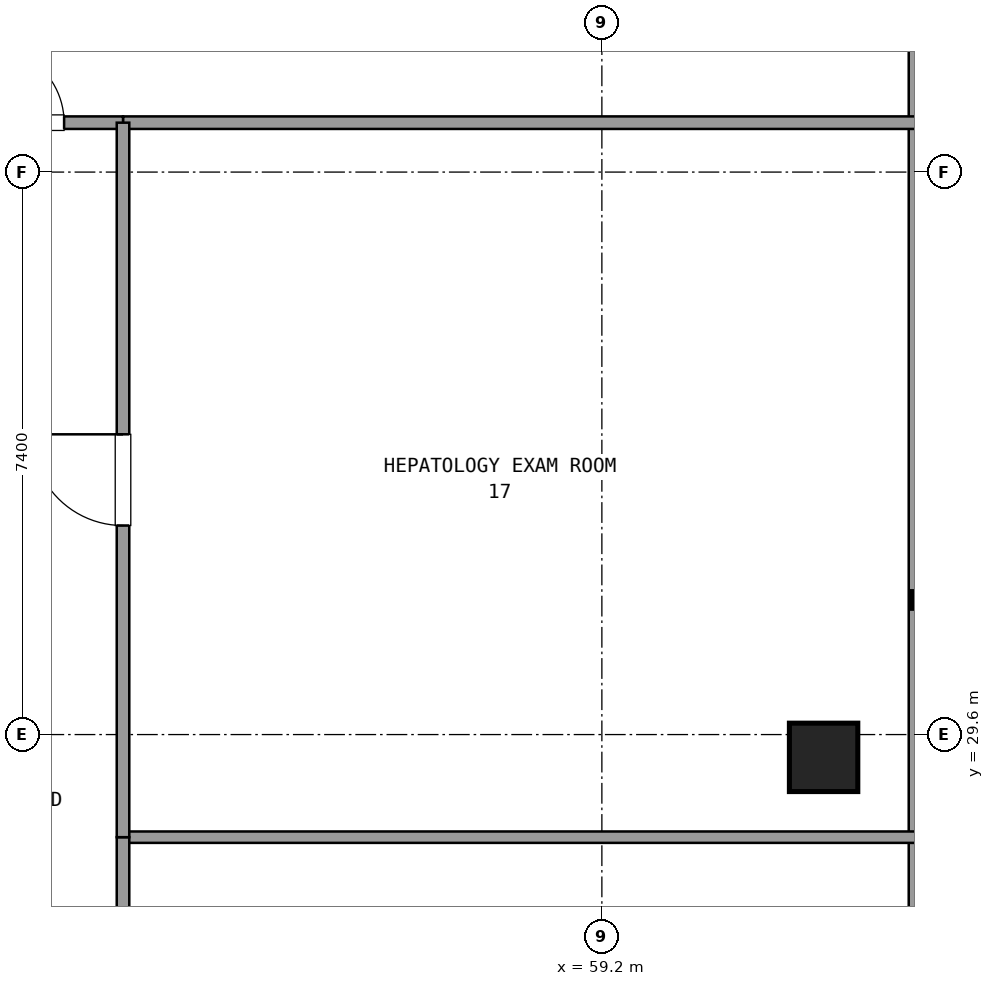
"""IFC4 building model, lengths in metres.
Left out: names, types, materials, properties, quantities, classifications, styles, units other than length and angle.
Written with IfcOpenShell. Run it as: python <this file> out.ifc"""

import sys

from ifc_helpers import new_model, si_unit, direction, frame, frame_2d, origin, origin_2d, place, context, subcontext, project, spatial, rectangle, extrude, element, fill, save


model = new_model("IFC4")
c1 = context("Model", 3, precision=1e-05, world=origin(), true_north=direction((0.0, 1.0)))
c2 = subcontext(c1, "Body", "Model", "MODEL_VIEW")
j1 = project(units=[si_unit("LENGTHUNIT", "METRE"), si_unit("PLANEANGLEUNIT", "RADIAN")], contexts=[c1])
p1 = place(None, origin())
s1 = spatial("IfcSite", under=j1, at=p1, CompositionType="ELEMENT")
p2 = place(p1, origin())
s2 = spatial("IfcBuilding", under=s1, at=p2, CompositionType="ELEMENT")
p3 = place(p2, frame((0.0, 0.0, 214.38)))
s3 = spatial("IfcBuildingStorey", under=s2, at=p3, CompositionType="ELEMENT", Elevation=214.38)
p4 = place(p3, frame((62.117, 29.3, 0.021), z_axis=(0.084573087246, 0.0, 0.99641727851), x_axis=(0.0, 1.0, 0.0)))
e1 = element("IfcColumn", 1, at=p4, inside=s3, PredefinedType="COLUMN", context=c2, shape_type="SweptSolid", body=[
    extrude(rectangle(XDim=0.9, YDim=0.9, at=origin_2d()), origin(), (0.0, 0.0, 1.0), 3.571),
])
p5 = place(p3, frame((63.357, 9.487, 0.0), z_axis=(0.0, 0.0, 1.0), x_axis=(0.0, 1.0, 0.0)))
e2 = element("IfcWall", 2, at=p5, inside=s3, PredefinedType="SOLIDWALL", context=c2, shape_type="SweptSolid", body=[
    extrude(rectangle(XDim=32.826, YDim=0.24, at=frame_2d((16.413, 0.0))), origin(), (0.0, 0.0, 1.0), 0.85),
])
p6 = place(p3, frame((52.9, 37.65, 0.0), z_axis=(0.0, 0.0, 1.0), x_axis=(1.0, 0.0, 0.0)))
e3 = element("IfcWall", 3, at=p6, inside=s3, PredefinedType="PARTITIONING", context=c2, shape_type="SweptSolid", body=[
    extrude(rectangle(XDim=10.437, YDim=0.165, at=frame_2d((5.219, 0.0))), origin(), (0.0, 0.0, 1.0), 2.61),
])
p7 = place(p3, frame((50.35, 37.65, 0.0), z_axis=(0.0, 0.0, 1.0), x_axis=(1.0, 0.0, 0.0)))
e4 = element("IfcWall", 4, at=p7, inside=s3, PredefinedType="PARTITIONING", context=c2, shape_type="SweptSolid", body=[
    extrude(rectangle(XDim=2.55, YDim=0.165, at=frame_2d((1.275, 0.0))), origin(), (0.0, 0.0, 1.0), 2.61),
])
p8 = place(p7, frame((0.775, 0.0, 0.0)))
e5 = element("IfcOpeningElement", 5, at=p8, cuts=e4, PredefinedType="OPENING", context=c2, shape_type="SweptSolid", body=[
    extrude(rectangle(XDim=1.0, YDim=2.15, at=frame_2d((0.5, 1.075))), frame((0.0, 0.093, 0.0), z_axis=(0.0, -1.0, 0.0), x_axis=(1.0, 0.0, 0.0)), (0.0, 0.0, 1.0), 0.185),
])
p9 = place(p3, frame((52.9, 28.25, 0.0), z_axis=(0.0, 0.0, 1.0), x_axis=(1.0, 0.0, 0.0)))
e6 = element("IfcWall", 6, at=p9, inside=s3, PredefinedType="PARTITIONING", context=c2, shape_type="SweptSolid", body=[
    extrude(rectangle(XDim=10.437, YDim=0.15, at=frame_2d((5.219, 0.0))), origin(), (0.0, 0.0, 1.0), 2.61),
])
p10 = place(p3, frame((52.9, 21.2, 0.0), z_axis=(0.0, 0.0, 1.0), x_axis=(0.0, 1.0, 0.0)))
e7 = element("IfcWall", 7, at=p10, inside=s3, PredefinedType="PARTITIONING", context=c2, shape_type="SweptSolid", body=[
    extrude(rectangle(XDim=7.05, YDim=0.165, at=frame_2d((3.525, 0.0))), origin(), (0.0, 0.0, 1.0), 2.61),
])
p11 = place(p10, frame((2.925, 0.0, 0.0)))
e8 = element("IfcOpeningElement", 8, at=p11, cuts=e7, PredefinedType="OPENING", context=c2, shape_type="SweptSolid", body=[
    extrude(rectangle(XDim=1.2, YDim=2.15, at=frame_2d((0.6, 1.075))), frame((0.0, 0.093, 0.0), z_axis=(0.0, -1.0, 0.0), x_axis=(1.0, 0.0, 0.0)), (0.0, 0.0, 1.0), 0.185),
])
p12 = place(p3, frame((52.9, 28.25, 0.0), z_axis=(0.0, 0.0, 1.0), x_axis=(0.0, 1.0, 0.0)))
e9 = element("IfcWall", 9, at=p12, inside=s3, PredefinedType="PARTITIONING", context=c2, shape_type="SweptSolid", body=[
    extrude(rectangle(XDim=9.4, YDim=0.165, at=frame_2d((4.7, 0.0))), origin(), (0.0, 0.0, 1.0), 2.61),
])
p13 = place(p12, frame((4.1, 0.0, 0.0)))
e10 = element("IfcOpeningElement", 10, at=p13, cuts=e9, PredefinedType="OPENING", context=c2, shape_type="SweptSolid", body=[
    extrude(rectangle(XDim=1.2, YDim=2.15, at=frame_2d((0.6, 1.075))), frame((0.0, 0.093, 0.0), z_axis=(0.0, -1.0, 0.0), x_axis=(1.0, 0.0, 0.0)), (0.0, 0.0, 1.0), 0.185),
])
p14 = place(p8, origin())
e11 = element("IfcDoor", 11, at=p14, inside=s3, OperationType="SINGLE_SWING_LEFT", PredefinedType="DOOR", context=c2, shape_type="SweptSolid", body=[
    extrude(rectangle(XDim=1.0, YDim=2.15, at=frame_2d((0.5, 1.075))), frame((0.0, 0.025, 0.0), z_axis=(0.0, -1.0, 0.0), x_axis=(1.0, 0.0, 0.0)), (0.0, 0.0, 1.0), 0.05),
])
fill(e5, e11)
p15 = place(p13, origin())
e12 = element("IfcDoor", 12, at=p15, inside=s3, OperationType="SINGLE_SWING_RIGHT", PredefinedType="DOOR", context=c2, shape_type="SweptSolid", body=[
    extrude(rectangle(XDim=1.2, YDim=2.15, at=frame_2d((0.6, 1.075))), frame((0.0, 0.025, 0.0), z_axis=(0.0, -1.0, 0.0), x_axis=(1.0, 0.0, 0.0)), (0.0, 0.0, 1.0), 0.05),
])
fill(e10, e12)
save(model, sys.argv[1])
